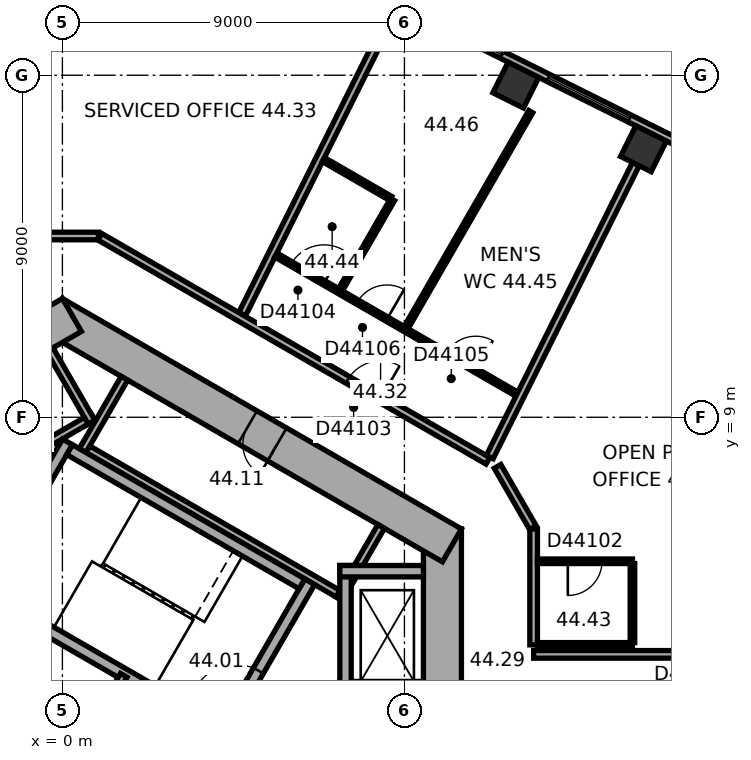
"""IFC4 building model, lengths in metres.
Left out: names, types, materials, properties, quantities, classifications, styles, units other than length and angle.
Written with IfcOpenShell. Run it as: python <this file> out.ifc"""

import sys

from ifc_helpers import new_model, si_unit, direction, frame, frame_2d, origin, origin_2d, place, context, subcontext, project, spatial, rectangle, extrude, element, fill, save


model = new_model("IFC4")
c1 = context("Model", 3, precision=1e-05, world=origin(), true_north=direction((0.0, 1.0)))
c2 = subcontext(c1, "Body", "Model", "MODEL_VIEW")
j1 = project(units=[si_unit("LENGTHUNIT", "METRE"), si_unit("PLANEANGLEUNIT", "RADIAN")], contexts=[c1])
p1 = place(None, origin())
s1 = spatial("IfcSite", under=j1, at=p1, CompositionType="ELEMENT")
p2 = place(p1, origin())
s2 = spatial("IfcBuilding", under=s1, at=p2, CompositionType="ELEMENT")
p3 = place(p2, frame((0.0, 0.0, 179.9)))
s3 = spatial("IfcBuildingStorey", under=s2, at=p3, CompositionType="ELEMENT", Elevation=179.9)
for number, where, z_axis, x_axis in (
    (1, (15.29, 16.065, 0.0), (0.0, 0.0, 1.0), (-0.895, 0.446, 0.0)),
    (2, (11.931, 17.74, 0.0), (0.0, 0.0, 1.0), (-0.895, 0.446, 0.0)),
):
    element("IfcColumn", number, at=place(p3, frame(where, z_axis=z_axis, x_axis=x_axis)), inside=s3, PredefinedType="COLUMN", context=c2, shape_type="SweptSolid", body=[
        extrude(rectangle(XDim=0.9, YDim=0.9, at=origin_2d()), origin(), (0.0, 0.0, 1.0), 3.7),
    ])
p4 = place(p3, frame((10.0, -6.062, 0.0), z_axis=(0.0, 0.0, 1.0), x_axis=(0.0, 1.0, 0.0)))
e3 = element("IfcWall", 3, at=p4, inside=s3, PredefinedType="SHEAR", context=c2, shape_type="SweptSolid", body=[
    extrude(rectangle(XDim=12.125, YDim=1.0, at=frame_2d((6.062, 0.0))), origin(), (0.0, 0.0, 1.0), 3.7),
])
p5 = place(p4, frame((6.262, 0.0, 0.0)))
e4 = element("IfcOpeningElement", 4, at=p5, cuts=e3, PredefinedType="OPENING", context=c2, shape_type="SweptSolid", body=[
    extrude(rectangle(XDim=1.5, YDim=2.1, at=frame_2d((0.75, 1.05))), frame((0.0, 0.51, 0.0), z_axis=(0.0, -1.0, 0.0), x_axis=(1.0, 0.0, 0.0)), (0.0, 0.0, 1.0), 1.02),
])
p6 = place(p4, frame((3.112, 0.0, 0.0)))
e5 = element("IfcOpeningElement", 5, at=p6, cuts=e3, PredefinedType="OPENING", context=c2, shape_type="SweptSolid", body=[
    extrude(rectangle(XDim=0.9, YDim=2.1, at=frame_2d((0.45, 1.05))), frame((0.0, 0.51, 0.0), z_axis=(0.0, -1.0, 0.0), x_axis=(1.0, 0.0, 0.0)), (0.0, 0.0, 1.0), 1.02),
])
p7 = place(p3, frame((10.25, 5.629, 0.0), z_axis=(0.0, 0.0, 1.0), x_axis=(-0.866022616891, 0.50000482701, 0.0)))
e6 = element("IfcWall", 6, at=p7, inside=s3, PredefinedType="SHEAR", context=c2, shape_type="SweptSolid", body=[
    extrude(rectangle(XDim=12.125, YDim=1.0, at=frame_2d((6.062, 0.0))), origin(), (0.0, 0.0, 1.0), 3.7),
])
p8 = place(p7, frame((5.312, 0.0, 0.0)))
e7 = element("IfcOpeningElement", 7, at=p8, cuts=e6, PredefinedType="OPENING", context=c2, shape_type="SweptSolid", body=[
    extrude(rectangle(XDim=0.9, YDim=2.1, at=frame_2d((0.45, 1.05))), frame((0.0, 0.51, 0.0), z_axis=(0.0, -1.0, 0.0), x_axis=(1.0, 0.0, 0.0)), (0.0, 0.0, 1.0), 1.02),
])
p9 = place(p3, frame((0.25, 11.691, 0.0), z_axis=(0.0, 0.0, 1.0), x_axis=(-0.866022616891, -0.50000482701, 0.0)))
e8 = element("IfcWall", 8, at=p9, inside=s3, PredefinedType="SHEAR", context=c2, shape_type="SweptSolid", body=[
    extrude(rectangle(XDim=12.125, YDim=1.0, at=frame_2d((6.062, 0.0))), origin(), (0.0, 0.0, 1.0), 3.7),
])
p10 = place(p9, frame((6.262, 0.0, 0.0)))
e9 = element("IfcOpeningElement", 9, at=p10, cuts=e8, PredefinedType="OPENING", context=c2, shape_type="SweptSolid", body=[
    extrude(rectangle(XDim=1.5, YDim=2.1, at=frame_2d((0.75, 1.05))), frame((0.0, 0.51, 0.0), z_axis=(0.0, -1.0, 0.0), x_axis=(1.0, 0.0, 0.0)), (0.0, 0.0, 1.0), 1.02),
])
p11 = place(p9, frame((1.812, 0.0, 0.0)))
e10 = element("IfcOpeningElement", 10, at=p11, cuts=e8, PredefinedType="OPENING", context=c2, shape_type="SweptSolid", body=[
    extrude(rectangle(XDim=0.9, YDim=2.1, at=frame_2d((0.45, 1.05))), frame((0.0, 0.51, 0.0), z_axis=(0.0, -1.0, 0.0), x_axis=(1.0, 0.0, 0.0)), (0.0, 0.0, 1.0), 1.02),
])
p12 = place(p9, frame((4.412, 0.0, 0.0)))
e11 = element("IfcOpeningElement", 11, at=p12, cuts=e8, PredefinedType="OPENING", context=c2, shape_type="SweptSolid", body=[
    extrude(rectangle(XDim=0.9, YDim=2.1, at=frame_2d((0.45, 1.05))), frame((0.0, 0.51, 0.0), z_axis=(0.0, -1.0, 0.0), x_axis=(1.0, 0.0, 0.0)), (0.0, 0.0, 1.0), 1.02),
])
p13 = place(p3, frame((19.464, 14.599, 0.0), z_axis=(0.0, 0.0, 1.0), x_axis=(-0.894935755043, 0.446195018289, 0.0)))
e12 = element("IfcWall", 12, at=p13, inside=s3, PredefinedType="STANDARD", context=c2, shape_type="SweptSolid", body=[
    extrude(rectangle(XDim=20.044, YDim=0.2, at=frame_2d((10.022, 0.0))), origin(), (0.0, 0.0, 1.0), 3.7),
])
p14 = place(p13, frame((1.313, 0.0, 0.9)))
e13 = element("IfcOpeningElement", 13, at=p14, cuts=e12, PredefinedType="OPENING", context=c2, shape_type="SweptSolid", body=[
    extrude(rectangle(XDim=2.4, YDim=2.0, at=frame_2d((1.2, 1.0))), frame((0.0, 0.11, 0.0), z_axis=(0.0, -1.0, 0.0), x_axis=(1.0, 0.0, 0.0)), (0.0, 0.0, 1.0), 0.22),
])
p15 = place(p13, frame((5.067, 0.0, 0.9)))
e14 = element("IfcOpeningElement", 14, at=p15, cuts=e12, PredefinedType="OPENING", context=c2, shape_type="SweptSolid", body=[
    extrude(rectangle(XDim=2.4, YDim=2.0, at=frame_2d((1.2, 1.0))), frame((0.0, 0.11, 0.0), z_axis=(0.0, -1.0, 0.0), x_axis=(1.0, 0.0, 0.0)), (0.0, 0.0, 1.0), 0.22),
])
p16 = place(p13, frame((8.821, 0.0, 0.9)))
e15 = element("IfcOpeningElement", 15, at=p16, cuts=e12, PredefinedType="OPENING", context=c2, shape_type="SweptSolid", body=[
    extrude(rectangle(XDim=2.4, YDim=2.0, at=frame_2d((1.2, 1.0))), frame((0.0, 0.11, 0.0), z_axis=(0.0, -1.0, 0.0), x_axis=(1.0, 0.0, 0.0)), (0.0, 0.0, 1.0), 0.22),
])
p17 = place(p13, frame((12.575, 0.0, 0.9)))
e16 = element("IfcOpeningElement", 16, at=p17, cuts=e12, PredefinedType="OPENING", context=c2, shape_type="SweptSolid", body=[
    extrude(rectangle(XDim=2.4, YDim=2.0, at=frame_2d((1.2, 1.0))), frame((0.0, 0.11, 0.0), z_axis=(0.0, -1.0, 0.0), x_axis=(1.0, 0.0, 0.0)), (0.0, 0.0, 1.0), 0.22),
])
p18 = place(p13, frame((16.329, 0.0, 0.9)))
e17 = element("IfcOpeningElement", 17, at=p18, cuts=e12, PredefinedType="OPENING", context=c2, shape_type="SweptSolid", body=[
    extrude(rectangle(XDim=2.4, YDim=2.0, at=frame_2d((1.2, 1.0))), frame((0.0, 0.11, 0.0), z_axis=(0.0, -1.0, 0.0), x_axis=(1.0, 0.0, 0.0)), (0.0, 0.0, 1.0), 0.22),
])
p19 = place(p3, frame((7.424, 4.259, 0.0), z_axis=(0.0, 0.0, 1.0), x_axis=(-0.866026010844, 0.49999894854, 0.0)))
e18 = element("IfcWall", 18, at=p19, inside=s3, PredefinedType="PARTITIONING", context=c2, shape_type="SweptSolid", body=[
    extrude(rectangle(XDim=8.0, YDim=0.2, at=frame_2d((4.0, 0.0))), origin(), (0.0, 0.0, 1.0), 3.42),
])
for number, where, z_axis, x_axis in (
    (19, (7.287, 4.222, 0.0), (0.0, 0.0, 1.0), (0.5, 0.866, 0.0)),
    (20, (0.532, 8.122, 0.0), (0.0, 0.0, 1.0), (0.5, 0.866, 0.0)),
):
    element("IfcWall", number, at=place(p3, frame(where, z_axis=z_axis, x_axis=x_axis)), inside=s3, PredefinedType="PARTITIONING", context=c2, shape_type="SweptSolid", body=[
        extrude(rectangle(XDim=2.2, YDim=0.2, at=frame_2d((1.1, 0.0))), origin(), (0.0, 0.0, 1.0), 3.42),
    ])
p20 = place(p3, frame((0.803, 9.009, 0.0), z_axis=(0.0, 0.0, 1.0), x_axis=(-0.866028230842, -0.499995103361, 0.0)))
e21 = element("IfcWall", 21, at=p20, inside=s3, PredefinedType="PARTITIONING", context=c2, shape_type="SweptSolid", body=[
    extrude(rectangle(XDim=5.4, YDim=0.2, at=frame_2d((2.7, 0.0))), origin(), (0.0, 0.0, 1.0), 3.42),
])
p21 = place(p3, frame((0.767, 8.872, 0.0), z_axis=(0.0, 0.0, 1.0), x_axis=(-0.499994660107, 0.866028486751, 0.0)))
e22 = element("IfcWall", 22, at=p21, inside=s3, PredefinedType="PARTITIONING", context=c2, shape_type="SweptSolid", body=[
    extrude(rectangle(XDim=2.2, YDim=0.2, at=frame_2d((1.1, 0.0))), origin(), (0.0, 0.0, 1.0), 3.42),
])
p22 = place(p3, frame((4.158, 0.602, 0.0), z_axis=(0.0, 0.0, 1.0), x_axis=(0.499977259774, 0.866038532462, 0.0)))
e23 = element("IfcWall", 23, at=p22, inside=s3, PredefinedType="SHEAR", context=c2, shape_type="SweptSolid", body=[
    extrude(rectangle(XDim=4.7, YDim=0.3, at=frame_2d((2.35, 0.0))), origin(), (0.0, 0.0, 1.0), 3.42),
])
p23 = place(p22, frame((0.8, 0.0, 0.0)))
e24 = element("IfcOpeningElement", 24, at=p23, cuts=e23, PredefinedType="OPENING", context=c2, shape_type="SweptSolid", body=[
    extrude(rectangle(XDim=1.2, YDim=2.1, at=frame_2d((0.6, 1.05))), frame((0.0, 0.16, 0.0), z_axis=(0.0, -1.0, 0.0), x_axis=(1.0, 0.0, 0.0)), (0.0, 0.0, 1.0), 0.32),
])
p24 = place(p3, frame((-2.216, 4.282, 0.0), z_axis=(0.0, 0.0, 1.0), x_axis=(0.499977259774, 0.866038532462, 0.0)))
e25 = element("IfcWall", 25, at=p24, inside=s3, PredefinedType="SHEAR", context=c2, shape_type="SweptSolid", body=[
    extrude(rectangle(XDim=4.7, YDim=0.3, at=frame_2d((2.35, 0.0))), origin(), (0.0, 0.0, 1.0), 3.42),
])
for number, where, z_axis, x_axis in (
    (26, (4.103, 0.807, 0.0), (0.0, 0.0, 1.0), (-0.866, 0.5, 0.0)),
    (27, (6.303, 4.617, 0.0), (0.0, 0.0, 1.0), (-0.866, 0.5, 0.0)),
):
    element("IfcWall", number, at=place(p3, frame(where, z_axis=z_axis, x_axis=x_axis)), inside=s3, PredefinedType="SHEAR", context=c2, shape_type="SweptSolid", body=[
        extrude(rectangle(XDim=7.06, YDim=0.3, at=frame_2d((3.53, 0.0))), origin(), (0.0, 0.0, 1.0), 3.42),
    ])
p25 = place(p3, frame((7.45, 1.75, 0.0), z_axis=(0.0, 0.0, 1.0), x_axis=(0.0, 1.0, 0.0)))
e28 = element("IfcWall", 28, at=p25, inside=s3, PredefinedType="SHEAR", context=c2, shape_type="SweptSolid", body=[
    extrude(rectangle(XDim=3.35, YDim=0.3, at=frame_2d((1.675, 0.0))), origin(), (0.0, 0.0, 1.0), 3.42),
])
p26 = place(p3, frame((7.3, 4.95, 0.0), z_axis=(0.0, 0.0, 1.0), x_axis=(1.0, 0.0, 0.0)))
e29 = element("IfcWall", 29, at=p26, inside=s3, PredefinedType="SHEAR", context=c2, shape_type="SweptSolid", body=[
    extrude(rectangle(XDim=2.2, YDim=0.3, at=frame_2d((1.1, 0.0))), origin(), (0.0, 0.0, 1.0), 3.42),
])
p27 = place(p3, frame((0.74, 0.696, 0.0), z_axis=(0.0, 0.0, 1.0), x_axis=(0.499956301907, 0.86605063142, 0.0)))
e30 = element("IfcWall", 30, at=p27, inside=s3, PredefinedType="PARTITIONING", context=c2, shape_type="SweptSolid", body=[
    extrude(rectangle(XDim=1.747, YDim=0.2, at=frame_2d((0.874, 0.0))), origin(), (0.0, 0.0, 1.0), 3.42),
])
p28 = place(p3, frame((0.95, 13.77, 0.0), z_axis=(0.0, 0.0, 1.0), x_axis=(-1.0, 0.0, 0.0)))
e31 = element("IfcWall", 31, at=p28, inside=s3, PredefinedType="PARTITIONING", context=c2, shape_type="SweptSolid", body=[
    extrude(rectangle(XDim=1.9, YDim=0.2, at=frame_2d((0.95, 0.0))), origin(), (0.0, 0.0, 1.0), 3.42),
])
p29 = place(p3, frame((7.318, 12.356, 0.0), z_axis=(0.0, 0.0, 1.0), x_axis=(0.499982138324, 0.866035715982, 0.0)))
e32 = element("IfcWall", 32, at=p29, inside=s3, PredefinedType="PARTITIONING", context=c2, shape_type="SweptSolid", body=[
    extrude(rectangle(XDim=2.74, YDim=0.12, at=frame_2d((1.37, 0.0))), origin(), (0.0, 0.0, 1.0), 3.42),
])
p30 = place(p3, frame((8.37, 19.013, 0.0), z_axis=(0.0, 0.0, 1.0), x_axis=(-0.446183598632, -0.894941448538, 0.0)))
e33 = element("IfcWall", 33, at=p30, inside=s3, PredefinedType="PARTITIONING", context=c2, shape_type="SweptSolid", body=[
    extrude(rectangle(XDim=8.156, YDim=0.2, at=frame_2d((4.078, 0.0))), origin(), (0.0, 0.0, 1.0), 3.42),
])
p31 = place(p3, frame((8.636, 14.759, 0.0), z_axis=(0.0, 0.0, 1.0), x_axis=(-0.866010195725, 0.500026340207, 0.0)))
e34 = element("IfcWall", 34, at=p31, inside=s3, PredefinedType="PARTITIONING", context=c2, shape_type="SweptSolid", body=[
    extrude(rectangle(XDim=2.04, YDim=0.12, at=frame_2d((1.02, 0.0))), origin(), (0.0, 0.0, 1.0), 3.42),
])
p32 = place(p3, frame((11.196, 7.854, 0.0), z_axis=(0.0, 0.0, 1.0), x_axis=(-0.866023877043, 0.500002644385, 0.0)))
e35 = element("IfcWall", 35, at=p32, inside=s3, PredefinedType="PARTITIONING", context=c2, shape_type="SweptSolid", body=[
    extrude(rectangle(XDim=11.792, YDim=0.2, at=frame_2d((5.896, 0.0))), origin(), (0.0, 0.0, 1.0), 3.42),
])
p33 = place(p32, frame((3.261, 0.0, 0.0)))
e36 = element("IfcOpeningElement", 36, at=p33, cuts=e35, PredefinedType="OPENING", context=c2, shape_type="SweptSolid", body=[
    extrude(rectangle(XDim=1.0, YDim=2.1, at=frame_2d((0.5, 1.05))), frame((0.0, 0.11, 0.0), z_axis=(0.0, -1.0, 0.0), x_axis=(1.0, 0.0, 0.0)), (0.0, 0.0, 1.0), 0.22),
])
p34 = place(p3, frame((11.959, 9.608, 0.0), z_axis=(0.0, 0.0, 1.0), x_axis=(-0.866018452427, 0.500012039911, 0.0)))
e37 = element("IfcWall", 37, at=p34, inside=s3, PredefinedType="PARTITIONING", context=c2, shape_type="SweptSolid", body=[
    extrude(rectangle(XDim=7.322, YDim=0.12, at=frame_2d((3.661, 0.0))), origin(), (0.0, 0.0, 1.0), 3.42),
])
p35 = place(p34, frame((5.858, 0.0, 0.0)))
e38 = element("IfcOpeningElement", 38, at=p35, cuts=e37, PredefinedType="OPENING", context=c2, shape_type="SweptSolid", body=[
    extrude(rectangle(XDim=1.0, YDim=2.1, at=frame_2d((0.5, 1.05))), frame((0.0, 0.07, 0.0), z_axis=(0.0, -1.0, 0.0), x_axis=(1.0, 0.0, 0.0)), (0.0, 0.0, 1.0), 0.14),
])
p36 = place(p34, frame((1.25, 0.0, 0.0)))
e39 = element("IfcOpeningElement", 39, at=p36, cuts=e37, PredefinedType="OPENING", context=c2, shape_type="SweptSolid", body=[
    extrude(rectangle(XDim=0.9, YDim=2.1, at=frame_2d((0.45, 1.05))), frame((0.0, 0.07, 0.0), z_axis=(0.0, -1.0, 0.0), x_axis=(1.0, 0.0, 0.0)), (0.0, 0.0, 1.0), 0.14),
])
p37 = place(p34, frame((3.947, 0.0, 0.0)))
e40 = element("IfcOpeningElement", 40, at=p37, cuts=e37, PredefinedType="OPENING", context=c2, shape_type="SweptSolid", body=[
    extrude(rectangle(XDim=0.9, YDim=2.1, at=frame_2d((0.45, 1.05))), frame((0.0, 0.07, 0.0), z_axis=(0.0, -1.0, 0.0), x_axis=(1.0, 0.0, 0.0)), (0.0, 0.0, 1.0), 0.14),
])
p38 = place(p3, frame((12.325, 17.041, 0.0), z_axis=(0.0, 0.0, 1.0), x_axis=(-0.499985538654, -0.866033752885, 0.0)))
e41 = element("IfcWall", 41, at=p38, inside=s3, PredefinedType="PARTITIONING", context=c2, shape_type="SweptSolid", body=[
    extrude(rectangle(XDim=6.56, YDim=0.12, at=frame_2d((3.28, 0.0))), origin(), (0.0, 0.0, 1.0), 3.42),
])
p39 = place(p3, frame((12.38, 6.097, 0.0), z_axis=(0.0, 0.0, 1.0), x_axis=(-0.499964847546, 0.866045698112, 0.0)))
e42 = element("IfcWall", 42, at=p39, inside=s3, PredefinedType="PARTITIONING", context=c2, shape_type="SweptSolid", body=[
    extrude(rectangle(XDim=1.86, YDim=0.2, at=frame_2d((0.93, 0.0))), origin(), (0.0, 0.0, 1.0), 3.42),
])
p40 = place(p3, frame((12.4, 3.011, 0.0), z_axis=(0.0, 0.0, 1.0), x_axis=(0.0, 1.0, 0.0)))
e43 = element("IfcWall", 43, at=p40, inside=s3, PredefinedType="PARTITIONING", context=c2, shape_type="SweptSolid", body=[
    extrude(rectangle(XDim=3.051, YDim=0.2, at=frame_2d((1.525, 0.0))), origin(), (0.0, 0.0, 1.0), 3.42),
])
p41 = place(p3, frame((12.5, 5.211, 0.0), z_axis=(0.0, 0.0, 1.0), x_axis=(1.0, 0.0, 0.0)))
e44 = element("IfcWall", 44, at=p41, inside=s3, PredefinedType="PARTITIONING", context=c2, shape_type="SweptSolid", body=[
    extrude(rectangle(XDim=2.5, YDim=0.12, at=frame_2d((1.25, 0.0))), origin(), (0.0, 0.0, 1.0), 3.42),
])
p42 = place(p41, frame((0.8, 0.0, 0.0)))
e45 = element("IfcOpeningElement", 45, at=p42, cuts=e44, PredefinedType="OPENING", context=c2, shape_type="SweptSolid", body=[
    extrude(rectangle(XDim=0.9, YDim=2.1, at=frame_2d((0.45, 1.05))), frame((0.0, 0.07, 0.0), z_axis=(0.0, -1.0, 0.0), x_axis=(1.0, 0.0, 0.0)), (0.0, 0.0, 1.0), 0.14),
])
p43 = place(p3, frame((15.0, 3.011, 0.0), z_axis=(0.0, 0.0, 1.0), x_axis=(-1.0, 0.0, 0.0)))
e46 = element("IfcWall", 46, at=p43, inside=s3, PredefinedType="PARTITIONING", context=c2, shape_type="SweptSolid", body=[
    extrude(rectangle(XDim=2.5, YDim=0.12, at=frame_2d((1.25, 0.0))), origin(), (0.0, 0.0, 1.0), 3.42),
])
p44 = place(p3, frame((15.0, 5.151, 0.0), z_axis=(0.0, 0.0, 1.0), x_axis=(0.0, -1.0, 0.0)))
e47 = element("IfcWall", 47, at=p44, inside=s3, PredefinedType="PARTITIONING", context=c2, shape_type="SweptSolid", body=[
    extrude(rectangle(XDim=2.08, YDim=0.12, at=frame_2d((1.04, 0.0))), origin(), (0.0, 0.0, 1.0), 3.42),
])
p45 = place(p3, frame((15.09, 15.663, 0.0), z_axis=(0.0, 0.0, 1.0), x_axis=(-0.446204491029, -0.894931032083, 0.0)))
e48 = element("IfcWall", 48, at=p45, inside=s3, PredefinedType="PARTITIONING", context=c2, shape_type="SweptSolid", body=[
    extrude(rectangle(XDim=8.615, YDim=0.2, at=frame_2d((4.308, 0.0))), origin(), (0.0, 0.0, 1.0), 3.42),
])
p46 = place(p3, frame((20.75, 2.761, 0.0), z_axis=(0.0, 0.0, 1.0), x_axis=(-1.0, 0.0, 0.0)))
e49 = element("IfcWall", 49, at=p46, inside=s3, PredefinedType="PARTITIONING", context=c2, shape_type="SweptSolid", body=[
    extrude(rectangle(XDim=8.35, YDim=0.2, at=frame_2d((4.175, 0.0))), origin(), (0.0, 0.0, 1.0), 3.42),
])
p47 = place(p46, frame((3.675, 0.0, 0.0)))
e50 = element("IfcOpeningElement", 50, at=p47, cuts=e49, PredefinedType="OPENING", context=c2, shape_type="SweptSolid", body=[
    extrude(rectangle(XDim=1.0, YDim=2.1, at=frame_2d((0.5, 1.05))), frame((0.0, 0.11, 0.0), z_axis=(0.0, -1.0, 0.0), x_axis=(1.0, 0.0, 0.0)), (0.0, 0.0, 1.0), 0.22),
])
p48 = place(p15, origin())
e51 = element("IfcWindow", 51, at=p48, inside=s3, PartitioningType="SINGLE_PANEL", PredefinedType="WINDOW", context=c2, shape_type="SweptSolid", body=[
    extrude(rectangle(XDim=2.4, YDim=2.0, at=frame_2d((1.2, 1.0))), frame((0.0, 0.03, 0.0), z_axis=(0.0, -1.0, 0.0), x_axis=(1.0, 0.0, 0.0)), (0.0, 0.0, 1.0), 0.06),
])
fill(e14, e51)
p49 = place(p16, origin())
e52 = element("IfcWindow", 52, at=p49, inside=s3, PartitioningType="SINGLE_PANEL", PredefinedType="WINDOW", context=c2, shape_type="SweptSolid", body=[
    extrude(rectangle(XDim=2.4, YDim=2.0, at=frame_2d((1.2, 1.0))), frame((0.0, 0.03, 0.0), z_axis=(0.0, -1.0, 0.0), x_axis=(1.0, 0.0, 0.0)), (0.0, 0.0, 1.0), 0.06),
])
fill(e15, e52)
p50 = place(p23, origin())
e53 = element("IfcDoor", 53, at=p50, inside=s3, OperationType="SINGLE_SWING_RIGHT", PredefinedType="DOOR", context=c2, shape_type="SweptSolid", body=[
    extrude(rectangle(XDim=1.2, YDim=2.1, at=frame_2d((0.6, 1.05))), frame((0.0, 0.025, 0.0), z_axis=(0.0, -1.0, 0.0), x_axis=(1.0, 0.0, 0.0)), (0.0, 0.0, 1.0), 0.05),
])
fill(e24, e53)
p51 = place(p8, origin())
e54 = element("IfcDoor", 54, at=p51, inside=s3, OperationType="SINGLE_SWING_LEFT", PredefinedType="DOOR", context=c2, shape_type="SweptSolid", body=[
    extrude(rectangle(XDim=0.9, YDim=2.1, at=frame_2d((0.45, 1.05))), frame((0.0, 0.025, 0.0), z_axis=(0.0, -1.0, 0.0), x_axis=(1.0, 0.0, 0.0)), (0.0, 0.0, 1.0), 0.05),
])
fill(e7, e54)
p52 = place(p42, origin())
e55 = element("IfcDoor", 55, at=p52, inside=s3, OperationType="SINGLE_SWING_LEFT", PredefinedType="DOOR", context=c2, shape_type="SweptSolid", body=[
    extrude(rectangle(XDim=0.9, YDim=2.1, at=frame_2d((0.45, 1.05))), frame((0.0, 0.025, 0.0), z_axis=(0.0, -1.0, 0.0), x_axis=(1.0, 0.0, 0.0)), (0.0, 0.0, 1.0), 0.05),
])
fill(e45, e55)
p53 = place(p33, origin())
e56 = element("IfcDoor", 56, at=p53, inside=s3, OperationType="SINGLE_SWING_LEFT", PredefinedType="DOOR", context=c2, shape_type="SweptSolid", body=[
    extrude(rectangle(XDim=1.0, YDim=2.1, at=frame_2d((0.5, 1.05))), frame((0.0, 0.025, 0.0), z_axis=(0.0, -1.0, 0.0), x_axis=(1.0, 0.0, 0.0)), (0.0, 0.0, 1.0), 0.05),
])
fill(e36, e56)
p54 = place(p35, origin())
e57 = element("IfcDoor", 57, at=p54, inside=s3, OperationType="SINGLE_SWING_LEFT", PredefinedType="DOOR", context=c2, shape_type="SweptSolid", body=[
    extrude(rectangle(XDim=1.0, YDim=2.1, at=frame_2d((0.5, 1.05))), frame((0.0, 0.025, 0.0), z_axis=(0.0, -1.0, 0.0), x_axis=(1.0, 0.0, 0.0)), (0.0, 0.0, 1.0), 0.05),
])
fill(e38, e57)
p55 = place(p36, origin())
e58 = element("IfcDoor", 58, at=p55, inside=s3, OperationType="SINGLE_SWING_LEFT", PredefinedType="DOOR", context=c2, shape_type="SweptSolid", body=[
    extrude(rectangle(XDim=0.9, YDim=2.1, at=frame_2d((0.45, 1.05))), frame((0.0, 0.025, 0.0), z_axis=(0.0, -1.0, 0.0), x_axis=(1.0, 0.0, 0.0)), (0.0, 0.0, 1.0), 0.05),
])
fill(e39, e58)
p56 = place(p37, origin())
e59 = element("IfcDoor", 59, at=p56, inside=s3, OperationType="SINGLE_SWING_LEFT", PredefinedType="DOOR", context=c2, shape_type="SweptSolid", body=[
    extrude(rectangle(XDim=0.9, YDim=2.1, at=frame_2d((0.45, 1.05))), frame((0.0, 0.025, 0.0), z_axis=(0.0, -1.0, 0.0), x_axis=(1.0, 0.0, 0.0)), (0.0, 0.0, 1.0), 0.05),
])
fill(e40, e59)
save(model, sys.argv[1])
